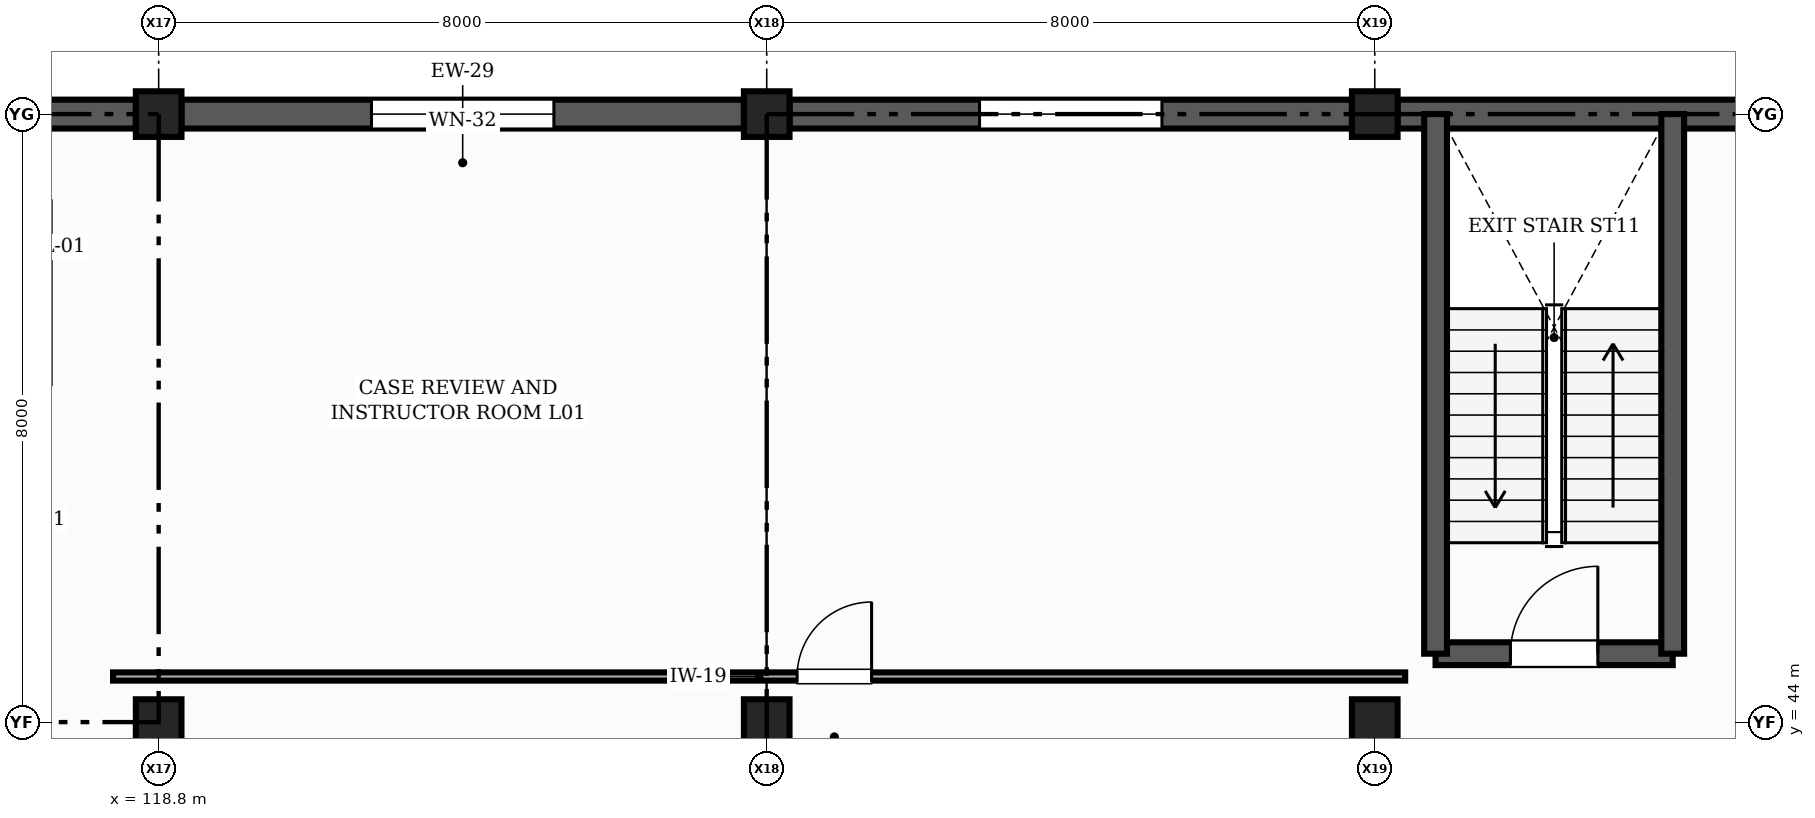
"""IFC4 building model, lengths in metres.
Left out: names, types, materials, properties, quantities, classifications, styles, units other than length and angle.
Written with IfcOpenShell. Run it as: python <this file> out.ifc"""

import sys

from ifc_helpers import new_model, si_unit, direction, frame, frame_2d, origin, origin_2d, place, context, subcontext, project, spatial, rectangle, extrude, element, fill, save


model = new_model("IFC4")
c1 = context("Model", 3, precision=1e-05, world=origin(), true_north=direction((0.0, 1.0)))
c2 = subcontext(c1, "Body", "Model", "MODEL_VIEW")
j1 = project(units=[si_unit("LENGTHUNIT", "METRE"), si_unit("PLANEANGLEUNIT", "RADIAN")], contexts=[c1])
p1 = place(None, origin())
s1 = spatial("IfcSite", under=j1, at=p1, CompositionType="ELEMENT")
p2 = place(p1, origin())
s2 = spatial("IfcBuilding", under=s1, at=p2, CompositionType="ELEMENT")
p3 = place(p2, frame((0.0, 0.0, 4.8)))
s3 = spatial("IfcBuildingStorey", under=s2, at=p3, CompositionType="ELEMENT", Elevation=4.8)
for number, where, z_axis, x_axis in (
    (1, (118.8, 44.0, 0.0), (0.0, 0.0, 1.0), (1.0, 0.0, 0.0)),
    (2, (118.8, 52.0, 0.0), (0.0, 0.0, 1.0), (1.0, 0.0, 0.0)),
    (3, (126.8, 44.0, 0.0), (0.0, 0.0, 1.0), (1.0, 0.0, 0.0)),
    (4, (126.8, 52.0, 0.0), (0.0, 0.0, 1.0), (1.0, 0.0, 0.0)),
    (5, (134.8, 44.0, 0.0), (0.0, 0.0, 1.0), (1.0, 0.0, 0.0)),
    (6, (134.8, 52.0, 0.0), (0.0, 0.0, 1.0), (1.0, 0.0, 0.0)),
):
    element("IfcColumn", number, at=place(p3, frame(where, z_axis=z_axis, x_axis=x_axis)), inside=s3, PredefinedType="COLUMN", context=c2, shape_type="SweptSolid", body=[
        extrude(rectangle(XDim=0.6, YDim=0.6, at=origin_2d()), origin(), (0.0, 0.0, 1.0), 4.2),
    ])
p4 = place(p3, frame((142.5, 52.0, 0.0), z_axis=(0.0, 0.0, 1.0), x_axis=(-1.0, 0.0, 0.0)))
e7 = element("IfcWall", 7, at=p4, inside=s3, PredefinedType="SOLIDWALL", context=c2, shape_type="SweptSolid", body=[
    extrude(rectangle(XDim=7.4, YDim=0.38, at=frame_2d((3.7, 0.0))), origin(), (0.0, 0.0, 1.0), 3.91),
])
p5 = place(p3, frame((134.5, 52.0, 0.0), z_axis=(0.0, 0.0, 1.0), x_axis=(-1.0, 0.0, 0.0)))
e8 = element("IfcWall", 8, at=p5, inside=s3, PredefinedType="SOLIDWALL", context=c2, shape_type="SweptSolid", body=[
    extrude(rectangle(XDim=7.4, YDim=0.38, at=frame_2d((3.7, 0.0))), origin(), (0.0, 0.0, 1.0), 3.16),
])
p6 = place(p5, frame((2.5, 0.0, 2.1)))
e9 = element("IfcOpeningElement", 9, at=p6, cuts=e8, PredefinedType="OPENING", context=c2, shape_type="SweptSolid", body=[
    extrude(rectangle(XDim=2.4, YDim=0.75, at=frame_2d((1.2, 0.375))), frame((0.0, 0.2, 0.0), z_axis=(0.0, -1.0, 0.0), x_axis=(1.0, 0.0, 0.0)), (0.0, 0.0, 1.0), 0.4),
])
p7 = place(p3, frame((126.5, 52.0, 0.0), z_axis=(0.0, 0.0, 1.0), x_axis=(-1.0, 0.0, 0.0)))
e10 = element("IfcWall", 10, at=p7, inside=s3, PredefinedType="SOLIDWALL", context=c2, shape_type="SweptSolid", body=[
    extrude(rectangle(XDim=7.4, YDim=0.38, at=frame_2d((3.7, 0.0))), origin(), (0.0, 0.0, 1.0), 3.16),
])
p8 = place(p7, frame((2.5, 0.0, 2.1)))
e11 = element("IfcOpeningElement", 11, at=p8, cuts=e10, PredefinedType="OPENING", context=c2, shape_type="SweptSolid", body=[
    extrude(rectangle(XDim=2.4, YDim=0.75, at=frame_2d((1.2, 0.375))), frame((0.0, 0.2, 0.0), z_axis=(0.0, -1.0, 0.0), x_axis=(1.0, 0.0, 0.0)), (0.0, 0.0, 1.0), 0.4),
])
p9 = place(p3, frame((118.5, 52.0, 0.0), z_axis=(0.0, 0.0, 1.0), x_axis=(-1.0, 0.0, 0.0)))
e12 = element("IfcWall", 12, at=p9, inside=s3, PredefinedType="SOLIDWALL", context=c2, shape_type="SweptSolid", body=[
    extrude(rectangle(XDim=7.4, YDim=0.38, at=frame_2d((3.7, 0.0))), origin(), (0.0, 0.0, 1.0), 3.91),
])
p10 = place(p3, frame((135.6, 44.9, 0.0), z_axis=(0.0, 0.0, 1.0), x_axis=(1.0, 0.0, 0.0)))
e13 = element("IfcWall", 13, at=p10, inside=s3, PredefinedType="SHEAR", context=c2, shape_type="SweptSolid", body=[
    extrude(rectangle(XDim=3.12, YDim=0.3, at=frame_2d((1.56, 0.0))), origin(), (0.0, 0.0, 1.0), 4.2),
])
p11 = place(p10, frame((0.985, 0.0, 0.0)))
e14 = element("IfcOpeningElement", 14, at=p11, cuts=e13, PredefinedType="OPENING", context=c2, shape_type="SweptSolid", body=[
    extrude(rectangle(XDim=1.15, YDim=2.15, at=frame_2d((0.575, 1.075))), frame((0.0, 0.16, 0.0), z_axis=(0.0, -1.0, 0.0), x_axis=(1.0, 0.0, 0.0)), (0.0, 0.0, 1.0), 0.32),
])
for number, where, z_axis, x_axis in (
    (15, (138.72, 44.9, 0.0), (0.0, 0.0, 1.0), (0.0, 1.0, 0.0)),
    (16, (135.6, 52.0, 0.0), (0.0, 0.0, 1.0), (0.0, -1.0, 0.0)),
):
    element("IfcWall", number, at=place(p3, frame(where, z_axis=z_axis, x_axis=x_axis)), inside=s3, PredefinedType="SHEAR", context=c2, shape_type="SweptSolid", body=[
        extrude(rectangle(XDim=7.1, YDim=0.3, at=frame_2d((3.55, 0.0))), origin(), (0.0, 0.0, 1.0), 4.2),
    ])
p12 = place(p3, frame((118.2, 44.6, 0.0), z_axis=(0.0, 0.0, 1.0), x_axis=(1.0, 0.0, 0.0)))
e17 = element("IfcWall", 17, at=p12, inside=s3, PredefinedType="PARTITIONING", context=c2, shape_type="SweptSolid", body=[
    extrude(rectangle(XDim=17.0, YDim=0.108, at=frame_2d((8.5, 0.0))), origin(), (0.0, 0.0, 1.0), 3.295),
])
p13 = place(p12, frame((9.0, 0.0, 0.0)))
e18 = element("IfcOpeningElement", 18, at=p13, cuts=e17, PredefinedType="OPENING", context=c2, shape_type="SweptSolid", body=[
    extrude(rectangle(XDim=0.98, YDim=2.12, at=frame_2d((0.49, 1.06))), frame((0.0, 0.064, 0.0), z_axis=(0.0, -1.0, 0.0), x_axis=(1.0, 0.0, 0.0)), (0.0, 0.0, 1.0), 0.128),
])
p14 = place(p6, origin())
e19 = element("IfcWindow", 19, at=p14, inside=s3, PartitioningType="SINGLE_PANEL", PredefinedType="WINDOW", context=c2, shape_type="SweptSolid", body=[
    extrude(rectangle(XDim=2.4, YDim=0.75, at=frame_2d((1.2, 0.375))), frame((0.0, 0.03, 0.0), z_axis=(0.0, -1.0, 0.0), x_axis=(1.0, 0.0, 0.0)), (0.0, 0.0, 1.0), 0.06),
])
fill(e9, e19)
p15 = place(p8, origin())
e20 = element("IfcWindow", 20, at=p15, inside=s3, PartitioningType="SINGLE_PANEL", PredefinedType="WINDOW", context=c2, shape_type="SweptSolid", body=[
    extrude(rectangle(XDim=2.4, YDim=0.75, at=frame_2d((1.2, 0.375))), frame((0.0, 0.03, 0.0), z_axis=(0.0, -1.0, 0.0), x_axis=(1.0, 0.0, 0.0)), (0.0, 0.0, 1.0), 0.06),
])
fill(e11, e20)
p16 = place(p11, origin())
e21 = element("IfcDoor", 21, at=p16, inside=s3, OperationType="SINGLE_SWING_RIGHT", PredefinedType="DOOR", context=c2, shape_type="SweptSolid", body=[
    extrude(rectangle(XDim=1.15, YDim=2.15, at=frame_2d((0.575, 1.075))), frame((0.0, 0.025, 0.0), z_axis=(0.0, -1.0, 0.0), x_axis=(1.0, 0.0, 0.0)), (0.0, 0.0, 1.0), 0.05),
])
fill(e14, e21)
p17 = place(p13, origin())
e22 = element("IfcDoor", 22, at=p17, inside=s3, OperationType="SINGLE_SWING_RIGHT", PredefinedType="DOOR", context=c2, shape_type="SweptSolid", body=[
    extrude(rectangle(XDim=0.98, YDim=2.12, at=frame_2d((0.49, 1.06))), frame((0.0, 0.025, 0.0), z_axis=(0.0, -1.0, 0.0), x_axis=(1.0, 0.0, 0.0)), (0.0, 0.0, 1.0), 0.05),
])
fill(e18, e22)
save(model, sys.argv[1])
